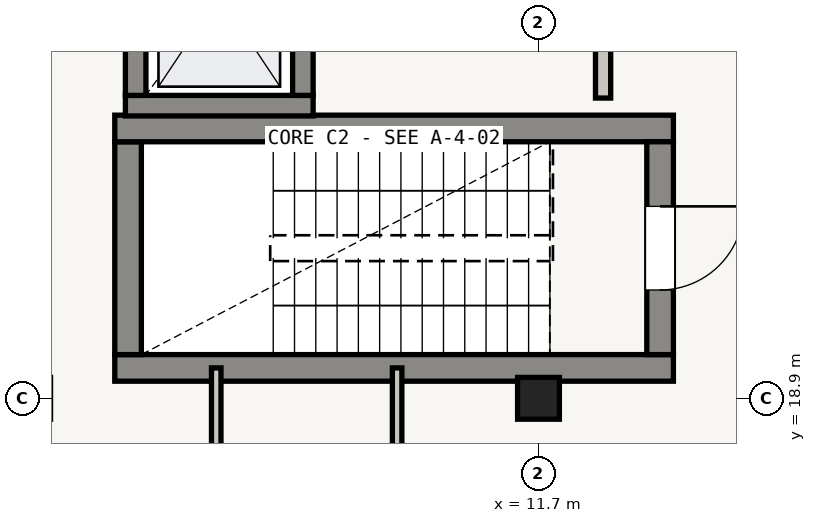
"""IFC4 building model, lengths in metres.
Left out: names, types, materials, properties, quantities, classifications, styles, units other than length and angle.
Written with IfcOpenShell. Run it as: python <this file> out.ifc"""

import sys

from ifc_helpers import new_model, si_unit, direction, frame, frame_2d, origin, origin_2d, place, context, subcontext, project, spatial, rectangle, extrude, element, fill, save


model = new_model("IFC4")
c1 = context("Model", 3, precision=1e-05, world=origin(), true_north=direction((0.0, 1.0)))
c2 = subcontext(c1, "Body", "Model", "MODEL_VIEW")
j1 = project(units=[si_unit("LENGTHUNIT", "METRE"), si_unit("PLANEANGLEUNIT", "RADIAN")], contexts=[c1])
p1 = place(None, origin())
s1 = spatial("IfcSite", under=j1, at=p1, CompositionType="ELEMENT")
p2 = place(p1, origin())
s2 = spatial("IfcBuilding", under=s1, at=p2, CompositionType="ELEMENT")
p3 = place(p2, frame((0.0, 0.0, 12.9)))
s3 = spatial("IfcBuildingStorey", under=s2, at=p3, CompositionType="ELEMENT", Elevation=12.9)
p4 = place(p3, frame((11.7, 18.9, 0.0), z_axis=(0.0, 0.0, 1.0), x_axis=(1.0, 0.0, 0.0)))
e1 = element("IfcColumn", 1, at=p4, inside=s3, PredefinedType="COLUMN", context=c2, shape_type="SweptSolid", body=[
    extrude(rectangle(XDim=0.55, YDim=0.55, at=origin_2d()), origin(), (0.0, 0.0, 1.0), 3.92),
])
p5 = place(p3, frame((13.475, 19.3, 0.0), z_axis=(0.0, 0.0, 1.0), x_axis=(-1.0, 0.0, 0.0)))
e2 = element("IfcWall", 2, at=p5, inside=s3, PredefinedType="SHEAR", context=c2, shape_type="SweptSolid", body=[
    extrude(rectangle(XDim=7.35, YDim=0.35, at=frame_2d((3.675, 0.0))), origin(), (0.0, 0.0, 1.0), 3.92),
])
p6 = place(p3, frame((6.3, 19.475, 0.0), z_axis=(0.0, 0.0, 1.0), x_axis=(0.0, 1.0, 0.0)))
e3 = element("IfcWall", 3, at=p6, inside=s3, PredefinedType="SHEAR", context=c2, shape_type="SweptSolid", body=[
    extrude(rectangle(XDim=2.8, YDim=0.35, at=frame_2d((1.4, 0.0))), origin(), (0.0, 0.0, 1.0), 3.92),
])
p7 = place(p3, frame((6.125, 22.45, 0.0), z_axis=(0.0, 0.0, 1.0), x_axis=(1.0, 0.0, 0.0)))
e4 = element("IfcWall", 4, at=p7, inside=s3, PredefinedType="SHEAR", context=c2, shape_type="SweptSolid", body=[
    extrude(rectangle(XDim=7.35, YDim=0.35, at=frame_2d((3.675, 0.0))), origin(), (0.0, 0.0, 1.0), 3.92),
])
p8 = place(p3, frame((13.3, 22.275, 0.0), z_axis=(0.0, 0.0, 1.0), x_axis=(0.0, -1.0, 0.0)))
e5 = element("IfcWall", 5, at=p8, inside=s3, PredefinedType="SHEAR", context=c2, shape_type="SweptSolid", body=[
    extrude(rectangle(XDim=2.8, YDim=0.35, at=frame_2d((1.4, 0.0))), origin(), (0.0, 0.0, 1.0), 3.92),
])
p9 = place(p8, frame((0.85, 0.0, 0.0)))
e6 = element("IfcOpeningElement", 6, at=p9, cuts=e5, PredefinedType="OPENING", context=c2, shape_type="SweptSolid", body=[
    extrude(rectangle(XDim=1.1, YDim=2.05, at=frame_2d((0.55, 1.025))), frame((0.0, 0.175, 0.0), z_axis=(0.0, -1.0, 0.0), x_axis=(1.0, 0.0, 0.0)), (0.0, 0.0, 1.0), 0.35),
])
p10 = place(p3, frame((8.735, 22.75, 0.0), z_axis=(0.0, 0.0, 1.0), x_axis=(-1.0, 0.0, 0.0)))
e7 = element("IfcWall", 7, at=p10, inside=s3, PredefinedType="SHEAR", context=c2, shape_type="SweptSolid", body=[
    extrude(rectangle(XDim=2.47, YDim=0.27, at=frame_2d((1.235, 0.0))), origin(), (0.0, 0.0, 1.0), 3.92),
])
p11 = place(p3, frame((6.4, 22.885, 0.0), z_axis=(0.0, 0.0, 1.0), x_axis=(0.0, 1.0, 0.0)))
e8 = element("IfcWall", 8, at=p11, inside=s3, PredefinedType="SHEAR", context=c2, shape_type="SweptSolid", body=[
    extrude(rectangle(XDim=2.63, YDim=0.27, at=frame_2d((1.315, 0.0))), origin(), (0.0, 0.0, 1.0), 3.92),
])
p12 = place(p3, frame((8.6, 25.515, 0.0), z_axis=(0.0, 0.0, 1.0), x_axis=(0.0, -1.0, 0.0)))
e9 = element("IfcWall", 9, at=p12, inside=s3, PredefinedType="SHEAR", context=c2, shape_type="SweptSolid", body=[
    extrude(rectangle(XDim=2.63, YDim=0.27, at=frame_2d((1.315, 0.0))), origin(), (0.0, 0.0, 1.0), 3.92),
])
p13 = place(p12, frame((0.755, 0.0, 0.0)))
e10 = element("IfcOpeningElement", 10, at=p13, cuts=e9, PredefinedType="OPENING", context=c2, shape_type="SweptSolid", body=[
    extrude(rectangle(XDim=1.12, YDim=2.1, at=frame_2d((0.56, 1.05))), frame((0.0, 0.135, 0.0), z_axis=(0.0, -1.0, 0.0), x_axis=(1.0, 0.0, 0.0)), (0.0, 0.0, 1.0), 0.27),
])
p14 = place(p3, frame((12.55, 25.75, 0.0), z_axis=(0.0, 0.0, 1.0), x_axis=(0.0, -1.0, 0.0)))
e11 = element("IfcWall", 11, at=p14, inside=s3, PredefinedType="SOLIDWALL", context=c2, shape_type="SweptSolid", body=[
    extrude(rectangle(XDim=2.9, YDim=0.2, at=frame_2d((1.45, 0.0))), origin(), (0.0, 0.0, 1.0), 2.94),
])
p15 = place(p14, frame((0.875, 0.0, 0.0)))
e12 = element("IfcOpeningElement", 12, at=p15, cuts=e11, PredefinedType="OPENING", context=c2, shape_type="SweptSolid", body=[
    extrude(rectangle(XDim=1.15, YDim=2.05, at=frame_2d((0.575, 1.025))), frame((0.0, 0.1, 0.0), z_axis=(0.0, -1.0, 0.0), x_axis=(1.0, 0.0, 0.0)), (0.0, 0.0, 1.0), 0.2),
])
for number, where, z_axis, x_axis in (
    (13, (9.84, 15.92, 0.0), (0.0, 0.0, 1.0), (0.0, 1.0, 0.0)),
    (14, (7.46, 19.3, 0.0), (0.0, 0.0, 1.0), (0.0, -1.0, 0.0)),
):
    element("IfcWall", number, at=place(p3, frame(where, z_axis=z_axis, x_axis=x_axis)), inside=s3, PredefinedType="PARTITIONING", context=c2, shape_type="SweptSolid", body=[
        extrude(rectangle(XDim=3.38, YDim=0.125, at=frame_2d((1.69, 0.0))), origin(), (0.0, 0.0, 1.0), 2.94),
    ])
p16 = place(p9, origin())
e15 = element("IfcDoor", 15, at=p16, inside=s3, OperationType="SINGLE_SWING_LEFT", PredefinedType="DOOR", context=c2, shape_type="SweptSolid", body=[
    extrude(rectangle(XDim=1.1, YDim=2.05, at=frame_2d((0.55, 1.025))), frame((0.0, 0.025, 0.0), z_axis=(0.0, -1.0, 0.0), x_axis=(1.0, 0.0, 0.0)), (0.0, 0.0, 1.0), 0.05),
])
fill(e6, e15)
save(model, sys.argv[1])
